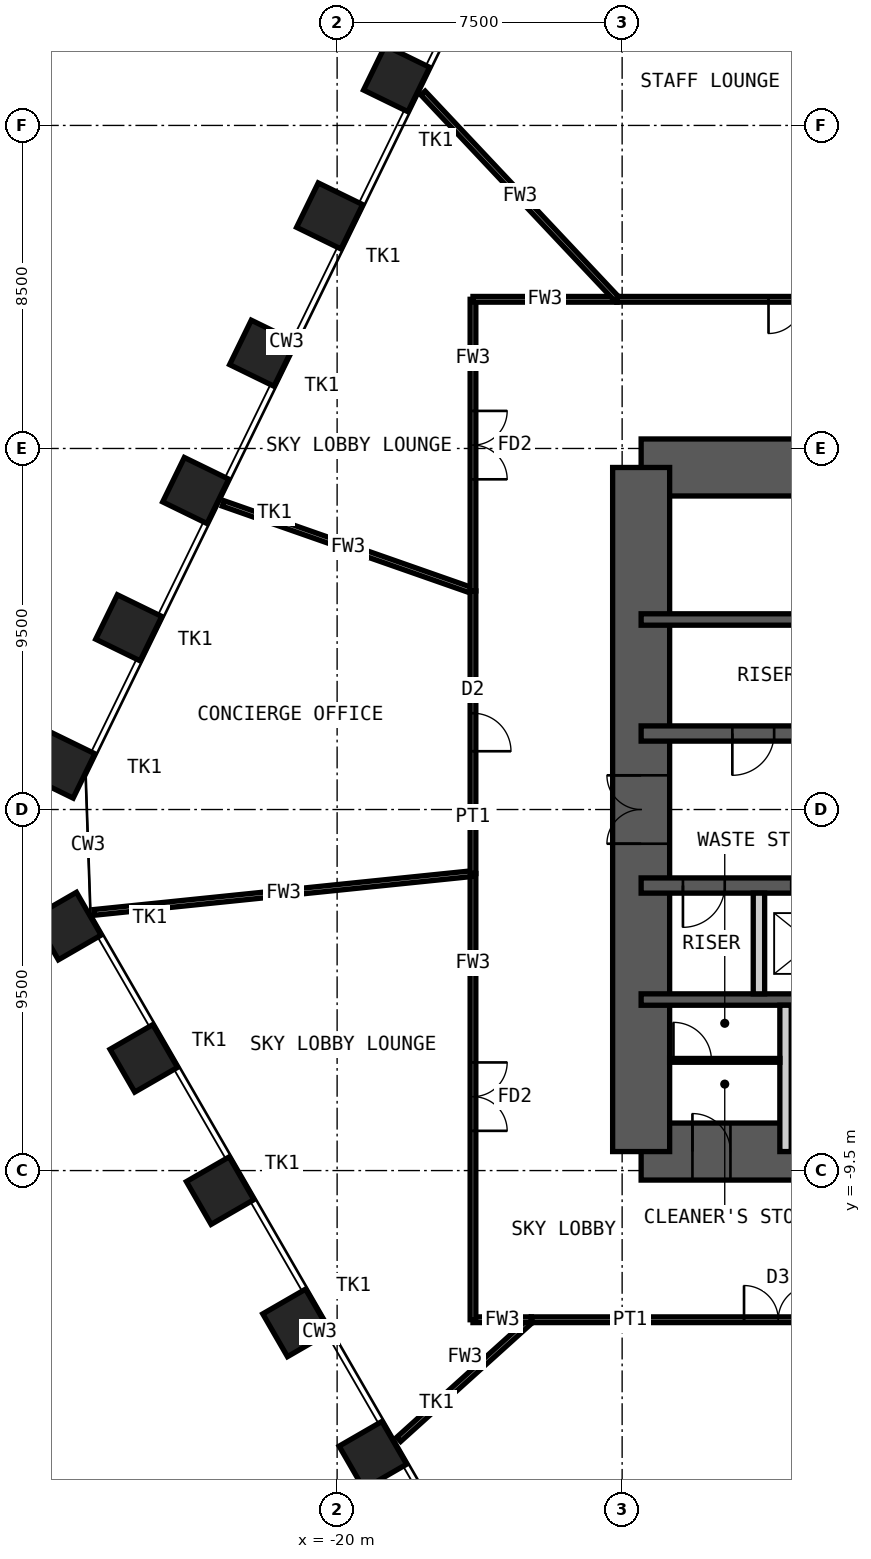
"""IFC4 building model, lengths in metres.
Left out: names, types, materials, properties, quantities, classifications, styles, units other than length and angle.
Written with IfcOpenShell. Run it as: python <this file> out.ifc"""

import sys

from ifc_helpers import new_model, si_unit, direction, frame, frame_2d, origin, origin_2d, place, context, subcontext, project, spatial, rectangle, hollow_rectangle, extrude, element, fill, save


model = new_model("IFC4")
c1 = context("Model", 3, precision=1e-05, world=origin(), true_north=direction((0.0, 1.0)))
c2 = subcontext(c1, "Body", "Model", "MODEL_VIEW")
j1 = project(units=[si_unit("LENGTHUNIT", "METRE"), si_unit("PLANEANGLEUNIT", "RADIAN")], contexts=[c1])
p1 = place(None, origin())
s1 = spatial("IfcSite", under=j1, at=p1, CompositionType="ELEMENT")
p2 = place(p1, origin())
s2 = spatial("IfcBuilding", under=s1, at=p2, CompositionType="ELEMENT")
p3 = place(p2, frame((0.0, 0.0, 103.0)))
s3 = spatial("IfcBuildingStorey", under=s2, at=p3, CompositionType="ELEMENT", Elevation=103.0)
for number, where, z_axis, x_axis in (
    (1, (-19.059, -16.989, 0.0), (0.0, 0.0, 1.0), (0.5, -0.866, 0.0)),
    (2, (-21.068, -13.509, 0.0), (0.0, 0.0, 1.0), (0.5, -0.866, 0.0)),
    (3, (-23.078, -10.028, 0.0), (0.0, 0.0, 1.0), (0.5, -0.866, 0.0)),
    (4, (-25.087, -6.547, 0.0), (0.0, 0.0, 1.0), (0.5, -0.866, 0.0)),
    (5, (-27.097, -3.067, 0.0), (0.0, 0.0, 1.0), (0.5, -0.866, 0.0)),
    (6, (-27.245, 1.169, 0.0), (0.0, 0.0, 1.0), (-0.438, -0.899, 0.0)),
    (7, (-25.483, 4.781, 0.0), (0.0, 0.0, 1.0), (-0.438, -0.899, 0.0)),
    (8, (-23.721, 8.394, 0.0), (0.0, 0.0, 1.0), (-0.438, -0.899, 0.0)),
    (9, (-21.959, 12.006, 0.0), (0.0, 0.0, 1.0), (-0.438, -0.899, 0.0)),
    (10, (-20.198, 15.618, 0.0), (0.0, 0.0, 1.0), (-0.438, -0.899, 0.0)),
    (11, (-18.436, 19.23, 0.0), (0.0, 0.0, 1.0), (-0.438, -0.899, 0.0)),
):
    element("IfcColumn", number, at=place(p3, frame(where, z_axis=z_axis, x_axis=x_axis)), inside=s3, PredefinedType="COLUMN", context=c2, shape_type="SweptSolid", body=[
        extrude(hollow_rectangle(XDim=1.3, YDim=1.3, WallThickness=0.1, at=origin_2d()), origin(), (0.0, 0.0, 1.0), 4.2),
    ])
p4 = place(p3, frame((-12.0, 9.0, 0.0), z_axis=(0.0, 0.0, 1.0), x_axis=(1.0, 0.0, 0.0)))
e12 = element("IfcWall", 12, at=p4, inside=s3, PredefinedType="SHEAR", context=c2, shape_type="SweptSolid", body=[
    extrude(rectangle(XDim=24.0, YDim=1.5, at=frame_2d((12.0, 0.0))), origin(), (0.0, 0.0, 1.0), 4.2),
])
p5 = place(p4, frame((10.4, 0.0, 0.0)))
e13 = element("IfcOpeningElement", 13, at=p5, cuts=e12, PredefinedType="OPENING", context=c2, shape_type="SweptSolid", body=[
    extrude(rectangle(XDim=1.0, YDim=2.1, at=frame_2d((0.5, 1.05))), frame((0.0, 0.76, 0.0), z_axis=(0.0, -1.0, 0.0), x_axis=(1.0, 0.0, 0.0)), (0.0, 0.0, 1.0), 1.52),
])
p6 = place(p4, frame((17.6, 0.0, 0.0)))
e14 = element("IfcOpeningElement", 14, at=p6, cuts=e12, PredefinedType="OPENING", context=c2, shape_type="SweptSolid", body=[
    extrude(rectangle(XDim=0.9, YDim=2.1, at=frame_2d((0.45, 1.05))), frame((0.0, 0.76, 0.0), z_axis=(0.0, -1.0, 0.0), x_axis=(1.0, 0.0, 0.0)), (0.0, 0.0, 1.0), 1.52),
])
p7 = place(p4, frame((21.9, 0.0, 0.0)))
e15 = element("IfcOpeningElement", 15, at=p7, cuts=e12, PredefinedType="OPENING", context=c2, shape_type="SweptSolid", body=[
    extrude(rectangle(XDim=0.9, YDim=2.1, at=frame_2d((0.45, 1.05))), frame((0.0, 0.76, 0.0), z_axis=(0.0, -1.0, 0.0), x_axis=(1.0, 0.0, 0.0)), (0.0, 0.0, 1.0), 1.52),
])
p8 = place(p3, frame((-12.0, -9.0, 0.0), z_axis=(0.0, 0.0, 1.0), x_axis=(1.0, 0.0, 0.0)))
e16 = element("IfcWall", 16, at=p8, inside=s3, PredefinedType="SHEAR", context=c2, shape_type="SweptSolid", body=[
    extrude(rectangle(XDim=24.0, YDim=1.5, at=frame_2d((12.0, 0.0))), origin(), (0.0, 0.0, 1.0), 4.2),
])
p9 = place(p8, frame((1.35, 0.0, 0.0)))
e17 = element("IfcOpeningElement", 17, at=p9, cuts=e16, PredefinedType="OPENING", context=c2, shape_type="SweptSolid", body=[
    extrude(rectangle(XDim=1.0, YDim=2.1, at=frame_2d((0.5, 1.05))), frame((0.0, 0.76, 0.0), z_axis=(0.0, -1.0, 0.0), x_axis=(1.0, 0.0, 0.0)), (0.0, 0.0, 1.0), 1.52),
])
p10 = place(p8, frame((5.325, 0.0, 0.0)))
e18 = element("IfcOpeningElement", 18, at=p10, cuts=e16, PredefinedType="OPENING", context=c2, shape_type="SweptSolid", body=[
    extrude(rectangle(XDim=1.15, YDim=2.1, at=frame_2d((0.575, 1.05))), frame((0.0, 0.76, 0.0), z_axis=(0.0, -1.0, 0.0), x_axis=(1.0, 0.0, 0.0)), (0.0, 0.0, 1.0), 1.52),
])
p11 = place(p8, frame((12.6, 0.0, 0.0)))
e19 = element("IfcOpeningElement", 19, at=p11, cuts=e16, PredefinedType="OPENING", context=c2, shape_type="SweptSolid", body=[
    extrude(rectangle(XDim=1.0, YDim=2.1, at=frame_2d((0.5, 1.05))), frame((0.0, 0.76, 0.0), z_axis=(0.0, -1.0, 0.0), x_axis=(1.0, 0.0, 0.0)), (0.0, 0.0, 1.0), 1.52),
])
p12 = place(p3, frame((-12.0, -9.0, 0.0), z_axis=(0.0, 0.0, 1.0), x_axis=(0.0, 1.0, 0.0)))
e20 = element("IfcWall", 20, at=p12, inside=s3, PredefinedType="SHEAR", context=c2, shape_type="SweptSolid", body=[
    extrude(rectangle(XDim=18.0, YDim=1.5, at=frame_2d((9.0, 0.0))), origin(), (0.0, 0.0, 1.0), 4.2),
])
p13 = place(p12, frame((8.1, 0.0, 0.0)))
e21 = element("IfcOpeningElement", 21, at=p13, cuts=e20, PredefinedType="OPENING", context=c2, shape_type="SweptSolid", body=[
    extrude(rectangle(XDim=1.8, YDim=2.1, at=frame_2d((0.9, 1.05))), frame((0.0, 0.76, 0.0), z_axis=(0.0, -1.0, 0.0), x_axis=(1.0, 0.0, 0.0)), (0.0, 0.0, 1.0), 1.52),
])
p14 = place(p3, frame((-12.0, 5.0, 0.0), z_axis=(0.0, 0.0, 1.0), x_axis=(1.0, 0.0, 0.0)))
e22 = element("IfcWall", 22, at=p14, inside=s3, PredefinedType="SHEAR", context=c2, shape_type="SweptSolid", body=[
    extrude(rectangle(XDim=24.0, YDim=0.3, at=frame_2d((12.0, 0.0))), origin(), (0.0, 0.0, 1.0), 4.2),
])
p15 = place(p3, frame((-12.0, 2.0, 0.0), z_axis=(0.0, 0.0, 1.0), x_axis=(1.0, 0.0, 0.0)))
e23 = element("IfcWall", 23, at=p15, inside=s3, PredefinedType="SHEAR", context=c2, shape_type="SweptSolid", body=[
    extrude(rectangle(XDim=24.0, YDim=0.4, at=frame_2d((12.0, 0.0))), origin(), (0.0, 0.0, 1.0), 4.2),
])
p16 = place(p15, frame((2.4, 0.0, 0.0)))
e24 = element("IfcOpeningElement", 24, at=p16, cuts=e23, PredefinedType="OPENING", context=c2, shape_type="SweptSolid", body=[
    extrude(rectangle(XDim=1.1, YDim=2.1, at=frame_2d((0.55, 1.05))), frame((0.0, 0.21, 0.0), z_axis=(0.0, -1.0, 0.0), x_axis=(1.0, 0.0, 0.0)), (0.0, 0.0, 1.0), 0.42),
])
p17 = place(p15, frame((22.0, 0.0, 0.0)))
e25 = element("IfcOpeningElement", 25, at=p17, cuts=e23, PredefinedType="OPENING", context=c2, shape_type="SweptSolid", body=[
    extrude(rectangle(XDim=1.1, YDim=2.1, at=frame_2d((0.55, 1.05))), frame((0.0, 0.21, 0.0), z_axis=(0.0, -1.0, 0.0), x_axis=(1.0, 0.0, 0.0)), (0.0, 0.0, 1.0), 0.42),
])
p18 = place(p15, frame((10.15, 0.0, 0.0)))
e26 = element("IfcOpeningElement", 26, at=p18, cuts=e23, PredefinedType="OPENING", context=c2, shape_type="SweptSolid", body=[
    extrude(rectangle(XDim=1.0, YDim=2.1, at=frame_2d((0.5, 1.05))), frame((0.0, 0.21, 0.0), z_axis=(0.0, -1.0, 0.0), x_axis=(1.0, 0.0, 0.0)), (0.0, 0.0, 1.0), 0.42),
])
p19 = place(p15, frame((6.9, 0.0, 0.0)))
e27 = element("IfcOpeningElement", 27, at=p19, cuts=e23, PredefinedType="OPENING", context=c2, shape_type="SweptSolid", body=[
    extrude(rectangle(XDim=1.0, YDim=2.1, at=frame_2d((0.5, 1.05))), frame((0.0, 0.21, 0.0), z_axis=(0.0, -1.0, 0.0), x_axis=(1.0, 0.0, 0.0)), (0.0, 0.0, 1.0), 0.42),
])
p20 = place(p15, frame((13.35, 0.0, 0.0)))
e28 = element("IfcOpeningElement", 28, at=p20, cuts=e23, PredefinedType="OPENING", context=c2, shape_type="SweptSolid", body=[
    extrude(rectangle(XDim=1.1, YDim=2.4, at=frame_2d((0.55, 1.2))), frame((0.0, 0.21, 0.0), z_axis=(0.0, -1.0, 0.0), x_axis=(1.0, 0.0, 0.0)), (0.0, 0.0, 1.0), 0.42),
])
p21 = place(p15, frame((16.15, 0.0, 0.0)))
e29 = element("IfcOpeningElement", 29, at=p21, cuts=e23, PredefinedType="OPENING", context=c2, shape_type="SweptSolid", body=[
    extrude(rectangle(XDim=1.1, YDim=2.4, at=frame_2d((0.55, 1.2))), frame((0.0, 0.21, 0.0), z_axis=(0.0, -1.0, 0.0), x_axis=(1.0, 0.0, 0.0)), (0.0, 0.0, 1.0), 0.42),
])
p22 = place(p15, frame((18.95, 0.0, 0.0)))
e30 = element("IfcOpeningElement", 30, at=p22, cuts=e23, PredefinedType="OPENING", context=c2, shape_type="SweptSolid", body=[
    extrude(rectangle(XDim=1.1, YDim=2.4, at=frame_2d((0.55, 1.2))), frame((0.0, 0.21, 0.0), z_axis=(0.0, -1.0, 0.0), x_axis=(1.0, 0.0, 0.0)), (0.0, 0.0, 1.0), 0.42),
])
p23 = place(p3, frame((-12.0, -2.0, 0.0), z_axis=(0.0, 0.0, 1.0), x_axis=(1.0, 0.0, 0.0)))
e31 = element("IfcWall", 31, at=p23, inside=s3, PredefinedType="SHEAR", context=c2, shape_type="SweptSolid", body=[
    extrude(rectangle(XDim=24.0, YDim=0.4, at=frame_2d((12.0, 0.0))), origin(), (0.0, 0.0, 1.0), 4.2),
])
p24 = place(p23, frame((1.1, 0.0, 0.0)))
e32 = element("IfcOpeningElement", 32, at=p24, cuts=e31, PredefinedType="OPENING", context=c2, shape_type="SweptSolid", body=[
    extrude(rectangle(XDim=1.1, YDim=2.1, at=frame_2d((0.55, 1.05))), frame((0.0, 0.21, 0.0), z_axis=(0.0, -1.0, 0.0), x_axis=(1.0, 0.0, 0.0)), (0.0, 0.0, 1.0), 0.42),
])
p25 = place(p23, frame((13.55, 0.0, 0.0)))
e33 = element("IfcOpeningElement", 33, at=p25, cuts=e31, PredefinedType="OPENING", context=c2, shape_type="SweptSolid", body=[
    extrude(rectangle(XDim=1.1, YDim=2.1, at=frame_2d((0.55, 1.05))), frame((0.0, 0.21, 0.0), z_axis=(0.0, -1.0, 0.0), x_axis=(1.0, 0.0, 0.0)), (0.0, 0.0, 1.0), 0.42),
])
p26 = place(p23, frame((20.7, 0.0, 0.0)))
e34 = element("IfcOpeningElement", 34, at=p26, cuts=e31, PredefinedType="OPENING", context=c2, shape_type="SweptSolid", body=[
    extrude(rectangle(XDim=1.1, YDim=2.1, at=frame_2d((0.55, 1.05))), frame((0.0, 0.21, 0.0), z_axis=(0.0, -1.0, 0.0), x_axis=(1.0, 0.0, 0.0)), (0.0, 0.0, 1.0), 0.42),
])
p27 = place(p23, frame((3.95, 0.0, 0.0)))
e35 = element("IfcOpeningElement", 35, at=p27, cuts=e31, PredefinedType="OPENING", context=c2, shape_type="SweptSolid", body=[
    extrude(rectangle(XDim=1.1, YDim=2.4, at=frame_2d((0.55, 1.2))), frame((0.0, 0.21, 0.0), z_axis=(0.0, -1.0, 0.0), x_axis=(1.0, 0.0, 0.0)), (0.0, 0.0, 1.0), 0.42),
])
p28 = place(p3, frame((-12.0, -5.0, 0.0), z_axis=(0.0, 0.0, 1.0), x_axis=(1.0, 0.0, 0.0)))
e36 = element("IfcWall", 36, at=p28, inside=s3, PredefinedType="SHEAR", context=c2, shape_type="SweptSolid", body=[
    extrude(rectangle(XDim=24.0, YDim=0.3, at=frame_2d((12.0, 0.0))), origin(), (0.0, 0.0, 1.0), 4.2),
])
p29 = place(p3, frame((-8.9, -4.85, 0.0), z_axis=(0.0, 0.0, 1.0), x_axis=(0.0, 1.0, 0.0)))
e37 = element("IfcWall", 37, at=p29, inside=s3, PredefinedType="PARTITIONING", context=c2, shape_type="SweptSolid", body=[
    extrude(rectangle(XDim=2.65, YDim=0.3, at=frame_2d((1.325, 0.0))), origin(), (0.0, 0.0, 1.0), 3.98),
])
p30 = place(p3, frame((-8.2, -9.0, 0.0), z_axis=(0.0, 0.0, 1.0), x_axis=(0.0, 1.0, 0.0)))
e38 = element("IfcWall", 38, at=p30, inside=s3, PredefinedType="PARTITIONING", context=c2, shape_type="SweptSolid", body=[
    extrude(rectangle(XDim=3.85, YDim=0.3, at=frame_2d((1.925, 0.0))), origin(), (0.0, 0.0, 1.0), 3.98),
])
p31 = place(p3, frame((-11.25, -6.6, 0.0), z_axis=(0.0, 0.0, 1.0), x_axis=(1.0, 0.0, 0.0)))
e39 = element("IfcWall", 39, at=p31, inside=s3, PredefinedType="PARTITIONING", context=c2, shape_type="SweptSolid", body=[
    extrude(rectangle(XDim=2.9, YDim=0.1, at=frame_2d((1.45, 0.0))), origin(), (0.0, 0.0, 1.0), 3.98),
])
p32 = place(p31, frame((0.1, 0.0, 0.0)))
e40 = element("IfcOpeningElement", 40, at=p32, cuts=e39, PredefinedType="OPENING", context=c2, shape_type="SweptSolid", body=[
    extrude(rectangle(XDim=1.0, YDim=2.4, at=frame_2d((0.5, 1.2))), frame((0.0, 0.06, 0.0), z_axis=(0.0, -1.0, 0.0), x_axis=(1.0, 0.0, 0.0)), (0.0, 0.0, 1.0), 0.12),
])
p33 = place(p3, frame((-22.998, 8.054, 0.0), z_axis=(0.0, 0.0, 1.0), x_axis=(0.943796578439, -0.330526880187, 0.0)))
e41 = element("IfcWall", 41, at=p33, inside=s3, PredefinedType="PARTITIONING", context=c2, shape_type="SweptSolid", body=[
    extrude(rectangle(XDim=6.964, YDim=0.15, at=frame_2d((3.482, 0.0))), origin(), (0.0, 0.0, 1.0), 2.93),
])
p34 = place(p3, frame((-16.425, 5.752, 0.0), z_axis=(0.0, 0.0, 1.0), x_axis=(0.0, 1.0, 0.0)))
e42 = element("IfcWall", 42, at=p34, inside=s3, PredefinedType="PARTITIONING", context=c2, shape_type="SweptSolid", body=[
    extrude(rectangle(XDim=7.673, YDim=0.15, at=frame_2d((3.836, 0.0))), origin(), (0.0, 0.0, 1.0), 4.03),
])
p35 = place(p34, frame((2.937, 0.0, 0.0)))
e43 = element("IfcOpeningElement", 43, at=p35, cuts=e42, PredefinedType="OPENING", context=c2, shape_type="SweptSolid", body=[
    extrude(rectangle(XDim=1.8, YDim=2.1, at=frame_2d((0.9, 1.05))), frame((0.0, 0.085, 0.0), z_axis=(0.0, -1.0, 0.0), x_axis=(1.0, 0.0, 0.0)), (0.0, 0.0, 1.0), 0.17),
])
p36 = place(p3, frame((-16.425, 13.425, 0.0), z_axis=(0.0, 0.0, 1.0), x_axis=(1.0, 0.0, 0.0)))
e44 = element("IfcWall", 44, at=p36, inside=s3, PredefinedType="PARTITIONING", context=c2, shape_type="SweptSolid", body=[
    extrude(rectangle(XDim=3.793, YDim=0.15, at=frame_2d((1.896, 0.0))), origin(), (0.0, 0.0, 1.0), 4.03),
])
p37 = place(p3, frame((-17.738, 18.851, 0.0), z_axis=(0.0, 0.0, 1.0), x_axis=(0.685300300524, -0.728260597659, 0.0)))
e45 = element("IfcWall", 45, at=p37, inside=s3, PredefinedType="PARTITIONING", context=c2, shape_type="SweptSolid", body=[
    extrude(rectangle(XDim=7.45, YDim=0.15, at=frame_2d((3.725, 0.0))), origin(), (0.0, 0.0, 1.0), 2.93),
])
p38 = place(p3, frame((-12.632, 13.425, 0.0), z_axis=(0.0, 0.0, 1.0), x_axis=(1.0, 0.0, 0.0)))
e46 = element("IfcWall", 46, at=p38, inside=s3, PredefinedType="PARTITIONING", context=c2, shape_type="SweptSolid", body=[
    extrude(rectangle(XDim=9.769, YDim=0.15, at=frame_2d((4.884, 0.0))), origin(), (0.0, 0.0, 1.0), 4.03),
])
p39 = place(p38, frame((3.984, 0.0, 0.0)))
e47 = element("IfcOpeningElement", 47, at=p39, cuts=e46, PredefinedType="OPENING", context=c2, shape_type="SweptSolid", body=[
    extrude(rectangle(XDim=1.8, YDim=2.4, at=frame_2d((0.9, 1.2))), frame((0.0, 0.085, 0.0), z_axis=(0.0, -1.0, 0.0), x_axis=(1.0, 0.0, 0.0)), (0.0, 0.0, 1.0), 0.17),
])
p40 = place(p3, frame((-1.897, -13.425, 0.0), z_axis=(0.0, 0.0, 1.0), x_axis=(-1.0, 0.0, 0.0)))
e48 = element("IfcWall", 48, at=p40, inside=s3, PredefinedType="PARTITIONING", context=c2, shape_type="SweptSolid", body=[
    extrude(rectangle(XDim=12.991, YDim=0.15, at=frame_2d((6.496, 0.0))), origin(), (0.0, 0.0, 1.0), 4.03),
])
p41 = place(p40, frame((5.596, 0.0, 0.0)))
e49 = element("IfcOpeningElement", 49, at=p41, cuts=e48, PredefinedType="OPENING", context=c2, shape_type="SweptSolid", body=[
    extrude(rectangle(XDim=1.8, YDim=2.4, at=frame_2d((0.9, 1.2))), frame((0.0, 0.085, 0.0), z_axis=(0.0, -1.0, 0.0), x_axis=(1.0, 0.0, 0.0)), (0.0, 0.0, 1.0), 0.17),
])
p42 = place(p3, frame((-18.378, -16.572, 0.0), z_axis=(0.0, 0.0, 1.0), x_axis=(0.742684208647, 0.669641819353, 0.0)))
e50 = element("IfcWall", 50, at=p42, inside=s3, PredefinedType="PARTITIONING", context=c2, shape_type="SweptSolid", body=[
    extrude(rectangle(XDim=4.699, YDim=0.15, at=frame_2d((2.35, 0.0))), origin(), (0.0, 0.0, 1.0), 2.93),
])
p43 = place(p3, frame((-14.888, -13.425, 0.0), z_axis=(0.0, 0.0, 1.0), x_axis=(-1.0, 0.0, 0.0)))
e51 = element("IfcWall", 51, at=p43, inside=s3, PredefinedType="PARTITIONING", context=c2, shape_type="SweptSolid", body=[
    extrude(rectangle(XDim=1.537, YDim=0.15, at=frame_2d((0.769, 0.0))), origin(), (0.0, 0.0, 1.0), 4.03),
])
p44 = place(p3, frame((-16.425, -13.425, 0.0), z_axis=(0.0, 0.0, 1.0), x_axis=(0.0, 1.0, 0.0)))
e52 = element("IfcWall", 52, at=p44, inside=s3, PredefinedType="PARTITIONING", context=c2, shape_type="SweptSolid", body=[
    extrude(rectangle(XDim=11.741, YDim=0.15, at=frame_2d((5.87, 0.0))), origin(), (0.0, 0.0, 1.0), 4.03),
])
p45 = place(p44, frame((4.97, 0.0, 0.0)))
e53 = element("IfcOpeningElement", 53, at=p45, cuts=e52, PredefinedType="OPENING", context=c2, shape_type="SweptSolid", body=[
    extrude(rectangle(XDim=1.8, YDim=2.1, at=frame_2d((0.9, 1.05))), frame((0.0, 0.085, 0.0), z_axis=(0.0, -1.0, 0.0), x_axis=(1.0, 0.0, 0.0)), (0.0, 0.0, 1.0), 0.17),
])
p46 = place(p3, frame((-26.391, -2.706, 0.0), z_axis=(0.0, 0.0, 1.0), x_axis=(0.99478359464, 0.102007842025, 0.0)))
e54 = element("IfcWall", 54, at=p46, inside=s3, PredefinedType="PARTITIONING", context=c2, shape_type="SweptSolid", body=[
    extrude(rectangle(XDim=10.019, YDim=0.15, at=frame_2d((5.009, 0.0))), origin(), (0.0, 0.0, 1.0), 3.03),
])
p47 = place(p3, frame((-16.425, -1.684, 0.0), z_axis=(0.0, 0.0, 1.0), x_axis=(0.0, 1.0, 0.0)))
e55 = element("IfcWall", 55, at=p47, inside=s3, PredefinedType="PARTITIONING", context=c2, shape_type="SweptSolid", body=[
    extrude(rectangle(XDim=7.436, YDim=0.15, at=frame_2d((3.718, 0.0))), origin(), (0.0, 0.0, 1.0), 4.03),
])
p48 = place(p47, frame((3.218, 0.0, 0.0)))
e56 = element("IfcOpeningElement", 56, at=p48, cuts=e55, PredefinedType="OPENING", context=c2, shape_type="SweptSolid", body=[
    extrude(rectangle(XDim=1.0, YDim=2.4, at=frame_2d((0.5, 1.2))), frame((0.0, 0.085, 0.0), z_axis=(0.0, -1.0, 0.0), x_axis=(1.0, 0.0, 0.0)), (0.0, 0.0, 1.0), 0.17),
])
p49 = place(p9, origin())
e57 = element("IfcDoor", 57, at=p49, inside=s3, OperationType="SINGLE_SWING_RIGHT", PredefinedType="DOOR", context=c2, shape_type="SweptSolid", body=[
    extrude(rectangle(XDim=1.0, YDim=2.1, at=frame_2d((0.5, 1.05))), frame((0.0, 0.025, 0.0), z_axis=(0.0, -1.0, 0.0), x_axis=(1.0, 0.0, 0.0)), (0.0, 0.0, 1.0), 0.05),
])
fill(e17, e57)
p50 = place(p16, origin())
e58 = element("IfcDoor", 58, at=p50, inside=s3, OperationType="SINGLE_SWING_LEFT", PredefinedType="DOOR", context=c2, shape_type="SweptSolid", body=[
    extrude(rectangle(XDim=1.1, YDim=2.1, at=frame_2d((0.55, 1.05))), frame((0.0, 0.025, 0.0), z_axis=(0.0, -1.0, 0.0), x_axis=(1.0, 0.0, 0.0)), (0.0, 0.0, 1.0), 0.05),
])
fill(e24, e58)
p51 = place(p24, origin())
e59 = element("IfcDoor", 59, at=p51, inside=s3, OperationType="SINGLE_SWING_LEFT", PredefinedType="DOOR", context=c2, shape_type="SweptSolid", body=[
    extrude(rectangle(XDim=1.1, YDim=2.1, at=frame_2d((0.55, 1.05))), frame((0.0, 0.025, 0.0), z_axis=(0.0, -1.0, 0.0), x_axis=(1.0, 0.0, 0.0)), (0.0, 0.0, 1.0), 0.05),
])
fill(e32, e59)
p52 = place(p13, origin())
e60 = element("IfcDoor", 60, at=p52, inside=s3, OperationType="DOUBLE_DOOR_DOUBLE_SWING", PredefinedType="DOOR", context=c2, shape_type="SweptSolid", body=[
    extrude(rectangle(XDim=1.8, YDim=2.1, at=frame_2d((0.9, 1.05))), frame((0.0, 0.025, 0.0), z_axis=(0.0, -1.0, 0.0), x_axis=(1.0, 0.0, 0.0)), (0.0, 0.0, 1.0), 0.05),
])
fill(e21, e60)
p53 = place(p32, origin())
e61 = element("IfcDoor", 61, at=p53, inside=s3, OperationType="SINGLE_SWING_RIGHT", PredefinedType="DOOR", context=c2, shape_type="SweptSolid", body=[
    extrude(rectangle(XDim=1.0, YDim=2.4, at=frame_2d((0.5, 1.2))), frame((0.0, 0.025, 0.0), z_axis=(0.0, -1.0, 0.0), x_axis=(1.0, 0.0, 0.0)), (0.0, 0.0, 1.0), 0.05),
])
fill(e40, e61)
p54 = place(p35, origin())
e62 = element("IfcDoor", 62, at=p54, inside=s3, OperationType="DOUBLE_DOOR_DOUBLE_SWING", PredefinedType="DOOR", context=c2, shape_type="SweptSolid", body=[
    extrude(rectangle(XDim=1.8, YDim=2.1, at=frame_2d((0.9, 1.05))), frame((0.0, 0.025, 0.0), z_axis=(0.0, -1.0, 0.0), x_axis=(1.0, 0.0, 0.0)), (0.0, 0.0, 1.0), 0.05),
])
fill(e43, e62)
p55 = place(p39, origin())
e63 = element("IfcDoor", 63, at=p55, inside=s3, OperationType="DOUBLE_DOOR_DOUBLE_SWING", PredefinedType="DOOR", context=c2, shape_type="SweptSolid", body=[
    extrude(rectangle(XDim=1.8, YDim=2.4, at=frame_2d((0.9, 1.2))), frame((0.0, 0.025, 0.0), z_axis=(0.0, -1.0, 0.0), x_axis=(1.0, 0.0, 0.0)), (0.0, 0.0, 1.0), 0.05),
])
fill(e47, e63)
p56 = place(p41, origin())
e64 = element("IfcDoor", 64, at=p56, inside=s3, OperationType="DOUBLE_DOOR_DOUBLE_SWING", PredefinedType="DOOR", context=c2, shape_type="SweptSolid", body=[
    extrude(rectangle(XDim=1.8, YDim=2.4, at=frame_2d((0.9, 1.2))), frame((0.0, 0.025, 0.0), z_axis=(0.0, -1.0, 0.0), x_axis=(1.0, 0.0, 0.0)), (0.0, 0.0, 1.0), 0.05),
])
fill(e49, e64)
p57 = place(p45, origin())
e65 = element("IfcDoor", 65, at=p57, inside=s3, OperationType="DOUBLE_DOOR_DOUBLE_SWING", PredefinedType="DOOR", context=c2, shape_type="SweptSolid", body=[
    extrude(rectangle(XDim=1.8, YDim=2.1, at=frame_2d((0.9, 1.05))), frame((0.0, 0.025, 0.0), z_axis=(0.0, -1.0, 0.0), x_axis=(1.0, 0.0, 0.0)), (0.0, 0.0, 1.0), 0.05),
])
fill(e53, e65)
p58 = place(p48, origin())
e66 = element("IfcDoor", 66, at=p58, inside=s3, OperationType="SINGLE_SWING_LEFT", PredefinedType="DOOR", context=c2, shape_type="SweptSolid", body=[
    extrude(rectangle(XDim=1.0, YDim=2.4, at=frame_2d((0.5, 1.2))), frame((0.0, 0.025, 0.0), z_axis=(0.0, -1.0, 0.0), x_axis=(1.0, 0.0, 0.0)), (0.0, 0.0, 1.0), 0.05),
])
fill(e56, e66)
save(model, sys.argv[1])
